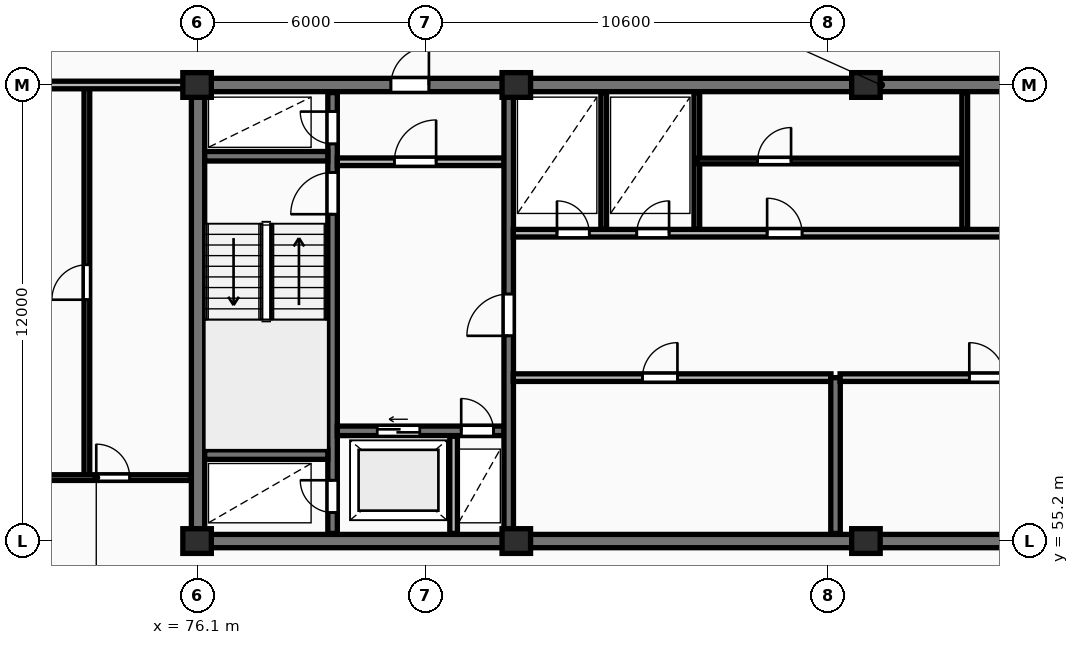
"""IFC4 building model, lengths in metres.
Left out: names, types, materials, properties, quantities, classifications, styles, units other than length and angle.
Written with IfcOpenShell. Run it as: python <this file> out.ifc"""

import sys

from ifc_helpers import new_model, si_unit, direction, frame, frame_2d, origin, origin_2d, place, context, subcontext, project, spatial, rectangle, extrude, element, fill, save


model = new_model("IFC4")
c1 = context("Model", 3, precision=1e-05, world=origin(), true_north=direction((0.0, 1.0)))
c2 = subcontext(c1, "Body", "Model", "MODEL_VIEW")
j1 = project(units=[si_unit("LENGTHUNIT", "METRE"), si_unit("PLANEANGLEUNIT", "RADIAN")], contexts=[c1])
p1 = place(None, origin())
s1 = spatial("IfcSite", under=j1, at=p1, CompositionType="ELEMENT")
p2 = place(p1, origin())
s2 = spatial("IfcBuilding", under=s1, at=p2, CompositionType="ELEMENT")
p3 = place(p2, frame((0.0, 0.0, 256.25)))
s3 = spatial("IfcBuildingStorey", under=s2, at=p3, CompositionType="ELEMENT", Elevation=256.25)
for number, where, z_axis, x_axis in (
    (1, (76.1, 55.2, 0.0), (0.0, 0.0, 1.0), (1.0, 0.0, 0.0)),
    (2, (76.1, 67.2, 0.0), (0.0, 0.0, 1.0), (1.0, 0.0, 0.0)),
    (3, (84.5, 55.2, 0.0), (0.0, 0.0, 1.0), (1.0, 0.0, 0.0)),
    (4, (84.5, 67.2, 0.0), (0.0, 0.0, 1.0), (1.0, 0.0, 0.0)),
    (5, (93.7, 55.2, 0.0), (0.0, 0.0, 1.0), (1.0, 0.0, 0.0)),
    (6, (93.7, 67.2, 0.0), (0.0, 0.0, 1.0), (1.0, 0.0, 0.0)),
):
    element("IfcColumn", number, at=place(p3, frame(where, z_axis=z_axis, x_axis=x_axis)), inside=s3, PredefinedType="COLUMN", context=c2, shape_type="SweptSolid", body=[
        extrude(rectangle(XDim=0.75, YDim=0.65, at=origin_2d()), origin(), (0.0, 0.0, 1.0), 3.45),
    ])
p4 = place(p3, frame((75.95, 55.2, 0.0), z_axis=(0.0, 0.0, 1.0), x_axis=(1.0, 0.0, 0.0)))
e7 = element("IfcWall", 7, at=p4, inside=s3, PredefinedType="SHEAR", context=c2, shape_type="SweptSolid", body=[
    extrude(rectangle(XDim=36.3, YDim=0.35, at=frame_2d((18.15, 0.0))), origin(), (0.0, 0.0, 1.0), 3.45),
])
p5 = place(p3, frame((76.125, 55.375, 0.0), z_axis=(0.0, 0.0, 1.0), x_axis=(0.0, 1.0, 0.0)))
e8 = element("IfcWall", 8, at=p5, inside=s3, PredefinedType="SHEAR", context=c2, shape_type="SweptSolid", body=[
    extrude(rectangle(XDim=11.65, YDim=0.35, at=frame_2d((5.825, 0.0))), origin(), (0.0, 0.0, 1.0), 3.45),
])
p6 = place(p3, frame((75.95, 67.2, 0.0), z_axis=(0.0, 0.0, 1.0), x_axis=(1.0, 0.0, 0.0)))
e9 = element("IfcWall", 9, at=p6, inside=s3, PredefinedType="SHEAR", context=c2, shape_type="SweptSolid", body=[
    extrude(rectangle(XDim=36.3, YDim=0.35, at=frame_2d((18.15, 0.0))), origin(), (0.0, 0.0, 1.0), 3.45),
])
p7 = place(p6, frame((5.25, 0.0, 0.0)))
e10 = element("IfcOpeningElement", 10, at=p7, cuts=e9, PredefinedType="OPENING", context=c2, shape_type="SweptSolid", body=[
    extrude(rectangle(XDim=1.0, YDim=2.15, at=frame_2d((0.5, 1.075))), frame((0.0, 0.185, 0.0), z_axis=(0.0, -1.0, 0.0), x_axis=(1.0, 0.0, 0.0)), (0.0, 0.0, 1.0), 0.37),
])
p8 = place(p6, frame((21.6, 0.0, 0.0)))
e11 = element("IfcOpeningElement", 11, at=p8, cuts=e9, PredefinedType="OPENING", context=c2, shape_type="SweptSolid", body=[
    extrude(rectangle(XDim=1.5, YDim=2.2, at=frame_2d((0.75, 1.1))), frame((0.0, 0.185, 0.0), z_axis=(0.0, -1.0, 0.0), x_axis=(1.0, 0.0, 0.0)), (0.0, 0.0, 1.0), 0.37),
])
p9 = place(p6, frame((30.45, 0.0, 0.0)))
e12 = element("IfcOpeningElement", 12, at=p9, cuts=e9, PredefinedType="OPENING", context=c2, shape_type="SweptSolid", body=[
    extrude(rectangle(XDim=1.0, YDim=2.15, at=frame_2d((0.5, 1.075))), frame((0.0, 0.185, 0.0), z_axis=(0.0, -1.0, 0.0), x_axis=(1.0, 0.0, 0.0)), (0.0, 0.0, 1.0), 0.37),
])
p10 = place(p3, frame((79.665, 55.4, 0.0), z_axis=(0.0, 0.0, 1.0), x_axis=(0.0, 1.0, 0.0)))
e13 = element("IfcWall", 13, at=p10, inside=s3, PredefinedType="SHEAR", context=c2, shape_type="SweptSolid", body=[
    extrude(rectangle(XDim=11.6, YDim=0.25, at=frame_2d((5.8, 0.0))), origin(), (0.0, 0.0, 1.0), 3.45),
])
p11 = place(p10, frame((0.55, 0.0, 0.0)))
e14 = element("IfcOpeningElement", 14, at=p11, cuts=e13, PredefinedType="OPENING", context=c2, shape_type="SweptSolid", body=[
    extrude(rectangle(XDim=0.85, YDim=2.05, at=frame_2d((0.425, 1.025))), frame((0.0, 0.135, 0.0), z_axis=(0.0, -1.0, 0.0), x_axis=(1.0, 0.0, 0.0)), (0.0, 0.0, 1.0), 0.27),
])
p12 = place(p10, frame((8.4, 0.0, 0.0)))
e15 = element("IfcOpeningElement", 15, at=p12, cuts=e13, PredefinedType="OPENING", context=c2, shape_type="SweptSolid", body=[
    extrude(rectangle(XDim=1.1, YDim=2.1, at=frame_2d((0.55, 1.05))), frame((0.0, 0.135, 0.0), z_axis=(0.0, -1.0, 0.0), x_axis=(1.0, 0.0, 0.0)), (0.0, 0.0, 1.0), 0.27),
])
p13 = place(p10, frame((10.25, 0.0, 0.0)))
e16 = element("IfcOpeningElement", 16, at=p13, cuts=e13, PredefinedType="OPENING", context=c2, shape_type="SweptSolid", body=[
    extrude(rectangle(XDim=0.85, YDim=2.05, at=frame_2d((0.425, 1.025))), frame((0.0, 0.135, 0.0), z_axis=(0.0, -1.0, 0.0), x_axis=(1.0, 0.0, 0.0)), (0.0, 0.0, 1.0), 0.27),
])
for number, where, z_axis, x_axis in (
    (17, (76.3, 57.475, 0.0), (0.0, 0.0, 1.0), (1.0, 0.0, 0.0)),
    (18, (76.3, 65.325, 0.0), (0.0, 0.0, 1.0), (1.0, 0.0, 0.0)),
):
    element("IfcWall", number, at=place(p3, frame(where, z_axis=z_axis, x_axis=x_axis)), inside=s3, PredefinedType="SHEAR", context=c2, shape_type="SweptSolid", body=[
        extrude(rectangle(XDim=3.24, YDim=0.25, at=frame_2d((1.62, 0.0))), origin(), (0.0, 0.0, 1.0), 3.45),
    ])
p14 = place(p3, frame((79.79, 58.1, 0.0), z_axis=(0.0, 0.0, 1.0), x_axis=(1.0, 0.0, 0.0)))
e19 = element("IfcWall", 19, at=p14, inside=s3, PredefinedType="SHEAR", context=c2, shape_type="SweptSolid", body=[
    extrude(rectangle(XDim=4.39, YDim=0.25, at=frame_2d((2.195, 0.0))), origin(), (0.0, 0.0, 1.0), 3.45),
])
p15 = place(p14, frame((1.05, 0.0, 0.0)))
e20 = element("IfcOpeningElement", 20, at=p15, cuts=e19, PredefinedType="OPENING", context=c2, shape_type="SweptSolid", body=[
    extrude(rectangle(XDim=1.12, YDim=2.12, at=frame_2d((0.56, 1.06))), frame((0.0, 0.135, 0.0), z_axis=(0.0, -1.0, 0.0), x_axis=(1.0, 0.0, 0.0)), (0.0, 0.0, 1.0), 0.27),
])
p16 = place(p14, frame((3.26, 0.0, 0.0)))
e21 = element("IfcOpeningElement", 21, at=p16, cuts=e19, PredefinedType="OPENING", context=c2, shape_type="SweptSolid", body=[
    extrude(rectangle(XDim=0.85, YDim=2.05, at=frame_2d((0.425, 1.025))), frame((0.0, 0.135, 0.0), z_axis=(0.0, -1.0, 0.0), x_axis=(1.0, 0.0, 0.0)), (0.0, 0.0, 1.0), 0.27),
])
p17 = place(p3, frame((82.85, 55.4, 0.0), z_axis=(0.0, 0.0, 1.0), x_axis=(0.0, 1.0, 0.0)))
e22 = element("IfcWall", 22, at=p17, inside=s3, PredefinedType="PARTITIONING", context=c2, shape_type="SweptSolid", body=[
    extrude(rectangle(XDim=2.56, YDim=0.2, at=frame_2d((1.28, 0.0))), origin(), (0.0, 0.0, 1.0), 3.17),
])
p18 = place(p3, frame((79.79, 65.18, 0.0), z_axis=(0.0, 0.0, 1.0), x_axis=(1.0, 0.0, 0.0)))
e23 = element("IfcWall", 23, at=p18, inside=s3, PredefinedType="PARTITIONING", context=c2, shape_type="SweptSolid", body=[
    extrude(rectangle(XDim=4.39, YDim=0.2, at=frame_2d((2.195, 0.0))), origin(), (0.0, 0.0, 1.0), 3.17),
])
p19 = place(p18, frame((1.5, 0.0, 0.0)))
e24 = element("IfcOpeningElement", 24, at=p19, cuts=e23, PredefinedType="OPENING", context=c2, shape_type="SweptSolid", body=[
    extrude(rectangle(XDim=1.1, YDim=2.1, at=frame_2d((0.55, 1.05))), frame((0.0, 0.11, 0.0), z_axis=(0.0, -1.0, 0.0), x_axis=(1.0, 0.0, 0.0)), (0.0, 0.0, 1.0), 0.22),
])
p20 = place(p3, frame((84.3, 55.4, 0.0), z_axis=(0.0, 0.0, 1.0), x_axis=(0.0, 1.0, 0.0)))
e25 = element("IfcWall", 25, at=p20, inside=s3, PredefinedType="SHEAR", context=c2, shape_type="SweptSolid", body=[
    extrude(rectangle(XDim=11.6, YDim=0.25, at=frame_2d((5.8, 0.0))), origin(), (0.0, 0.0, 1.0), 3.45),
])
p21 = place(p20, frame((5.2, 0.0, 0.0)))
e26 = element("IfcOpeningElement", 26, at=p21, cuts=e25, PredefinedType="OPENING", context=c2, shape_type="SweptSolid", body=[
    extrude(rectangle(XDim=1.1, YDim=2.1, at=frame_2d((0.55, 1.05))), frame((0.0, 0.135, 0.0), z_axis=(0.0, -1.0, 0.0), x_axis=(1.0, 0.0, 0.0)), (0.0, 0.0, 1.0), 0.27),
])
p22 = place(p3, frame((84.42, 59.5, 0.0), z_axis=(0.0, 0.0, 1.0), x_axis=(1.0, 0.0, 0.0)))
e27 = element("IfcWall", 27, at=p22, inside=s3, PredefinedType="PARTITIONING", context=c2, shape_type="SweptSolid", body=[
    extrude(rectangle(XDim=8.36, YDim=0.2, at=frame_2d((4.18, 0.0))), origin(), (0.0, 0.0, 1.0), 3.17),
])
p23 = place(p22, frame((3.4, 0.0, 0.0)))
e28 = element("IfcOpeningElement", 28, at=p23, cuts=e27, PredefinedType="OPENING", context=c2, shape_type="SweptSolid", body=[
    extrude(rectangle(XDim=0.92, YDim=2.08, at=frame_2d((0.46, 1.04))), frame((0.0, 0.11, 0.0), z_axis=(0.0, -1.0, 0.0), x_axis=(1.0, 0.0, 0.0)), (0.0, 0.0, 1.0), 0.22),
])
p24 = place(p3, frame((92.9, 55.4, 0.0), z_axis=(0.0, 0.0, 1.0), x_axis=(0.0, 1.0, 0.0)))
e29 = element("IfcWall", 29, at=p24, inside=s3, PredefinedType="SHEAR", context=c2, shape_type="SweptSolid", body=[
    extrude(rectangle(XDim=4.1, YDim=0.25, at=frame_2d((2.05, 0.0))), origin(), (0.0, 0.0, 1.0), 3.45),
])
p25 = place(p3, frame((93.02, 59.5, 0.0), z_axis=(0.0, 0.0, 1.0), x_axis=(1.0, 0.0, 0.0)))
e30 = element("IfcWall", 30, at=p25, inside=s3, PredefinedType="PARTITIONING", context=c2, shape_type="SweptSolid", body=[
    extrude(rectangle(XDim=8.36, YDim=0.2, at=frame_2d((4.18, 0.0))), origin(), (0.0, 0.0, 1.0), 3.17),
])
p26 = place(p25, frame((3.4, 0.0, 0.0)))
e31 = element("IfcOpeningElement", 31, at=p26, cuts=e30, PredefinedType="OPENING", context=c2, shape_type="SweptSolid", body=[
    extrude(rectangle(XDim=0.92, YDim=2.08, at=frame_2d((0.46, 1.04))), frame((0.0, 0.11, 0.0), z_axis=(0.0, -1.0, 0.0), x_axis=(1.0, 0.0, 0.0)), (0.0, 0.0, 1.0), 0.22),
])
for number, where, z_axis, x_axis in (
    (32, (86.8, 63.4, 0.0), (0.0, 0.0, 1.0), (0.0, 1.0, 0.0)),
    (33, (89.25, 63.4, 0.0), (0.0, 0.0, 1.0), (0.0, 1.0, 0.0)),
):
    element("IfcWall", number, at=place(p3, frame(where, z_axis=z_axis, x_axis=x_axis)), inside=s3, PredefinedType="PARTITIONING", context=c2, shape_type="SweptSolid", body=[
        extrude(rectangle(XDim=3.6, YDim=0.15, at=frame_2d((1.8, 0.0))), origin(), (0.0, 0.0, 1.0), 3.17),
    ])
p27 = place(p3, frame((89.25, 65.2, 0.0), z_axis=(0.0, 0.0, 1.0), x_axis=(1.0, 0.0, 0.0)))
e34 = element("IfcWall", 34, at=p27, inside=s3, PredefinedType="PARTITIONING", context=c2, shape_type="SweptSolid", body=[
    extrude(rectangle(XDim=7.05, YDim=0.15, at=frame_2d((3.525, 0.0))), origin(), (0.0, 0.0, 1.0), 3.17),
])
p28 = place(p27, frame((1.6, 0.0, 0.0)))
e35 = element("IfcOpeningElement", 35, at=p28, cuts=e34, PredefinedType="OPENING", context=c2, shape_type="SweptSolid", body=[
    extrude(rectangle(XDim=0.88, YDim=2.06, at=frame_2d((0.44, 1.03))), frame((0.0, 0.085, 0.0), z_axis=(0.0, -1.0, 0.0), x_axis=(1.0, 0.0, 0.0)), (0.0, 0.0, 1.0), 0.17),
])
p29 = place(p3, frame((96.3, 63.4, 0.0), z_axis=(0.0, 0.0, 1.0), x_axis=(0.0, 1.0, 0.0)))
e36 = element("IfcWall", 36, at=p29, inside=s3, PredefinedType="PARTITIONING", context=c2, shape_type="SweptSolid", body=[
    extrude(rectangle(XDim=3.6, YDim=0.15, at=frame_2d((1.8, 0.0))), origin(), (0.0, 0.0, 1.0), 3.17),
])
p30 = place(p3, frame((84.42, 63.3, 0.0), z_axis=(0.0, 0.0, 1.0), x_axis=(1.0, 0.0, 0.0)))
e37 = element("IfcWall", 37, at=p30, inside=s3, PredefinedType="PARTITIONING", context=c2, shape_type="SweptSolid", body=[
    extrude(rectangle(XDim=19.83, YDim=0.2, at=frame_2d((9.915, 0.0))), origin(), (0.0, 0.0, 1.0), 3.17),
])
p31 = place(p30, frame((1.15, 0.0, 0.0)))
e38 = element("IfcOpeningElement", 38, at=p31, cuts=e37, PredefinedType="OPENING", context=c2, shape_type="SweptSolid", body=[
    extrude(rectangle(XDim=0.85, YDim=2.05, at=frame_2d((0.425, 1.025))), frame((0.0, 0.11, 0.0), z_axis=(0.0, -1.0, 0.0), x_axis=(1.0, 0.0, 0.0)), (0.0, 0.0, 1.0), 0.22),
])
p32 = place(p30, frame((3.25, 0.0, 0.0)))
e39 = element("IfcOpeningElement", 39, at=p32, cuts=e37, PredefinedType="OPENING", context=c2, shape_type="SweptSolid", body=[
    extrude(rectangle(XDim=0.85, YDim=2.05, at=frame_2d((0.425, 1.025))), frame((0.0, 0.11, 0.0), z_axis=(0.0, -1.0, 0.0), x_axis=(1.0, 0.0, 0.0)), (0.0, 0.0, 1.0), 0.22),
])
p33 = place(p30, frame((13.08, 0.0, 0.0)))
e40 = element("IfcOpeningElement", 40, at=p33, cuts=e37, PredefinedType="OPENING", context=c2, shape_type="SweptSolid", body=[
    extrude(rectangle(XDim=1.5, YDim=2.2, at=frame_2d((0.75, 1.1))), frame((0.0, 0.11, 0.0), z_axis=(0.0, -1.0, 0.0), x_axis=(1.0, 0.0, 0.0)), (0.0, 0.0, 1.0), 0.22),
])
p34 = place(p30, frame((6.68, 0.0, 0.0)))
e41 = element("IfcOpeningElement", 41, at=p34, cuts=e37, PredefinedType="OPENING", context=c2, shape_type="SweptSolid", body=[
    extrude(rectangle(XDim=0.92, YDim=2.08, at=frame_2d((0.46, 1.04))), frame((0.0, 0.11, 0.0), z_axis=(0.0, -1.0, 0.0), x_axis=(1.0, 0.0, 0.0)), (0.0, 0.0, 1.0), 0.22),
])
p35 = place(p30, frame((16.33, 0.0, 0.0)))
e42 = element("IfcOpeningElement", 42, at=p35, cuts=e37, PredefinedType="OPENING", context=c2, shape_type="SweptSolid", body=[
    extrude(rectangle(XDim=0.88, YDim=2.06, at=frame_2d((0.44, 1.03))), frame((0.0, 0.11, 0.0), z_axis=(0.0, -1.0, 0.0), x_axis=(1.0, 0.0, 0.0)), (0.0, 0.0, 1.0), 0.22),
])
p36 = place(p3, frame((73.2, 56.87, 0.0), z_axis=(0.0, 0.0, 1.0), x_axis=(0.0, 1.0, 0.0)))
e43 = element("IfcWall", 43, at=p36, inside=s3, PredefinedType="PARTITIONING", context=c2, shape_type="SweptSolid", body=[
    extrude(rectangle(XDim=10.28, YDim=0.15, at=frame_2d((5.14, 0.0))), origin(), (0.0, 0.0, 1.0), 3.17),
])
p37 = place(p36, frame((4.68, 0.0, 0.0)))
e44 = element("IfcOpeningElement", 44, at=p37, cuts=e43, PredefinedType="OPENING", context=c2, shape_type="SweptSolid", body=[
    extrude(rectangle(XDim=0.92, YDim=2.08, at=frame_2d((0.46, 1.04))), frame((0.0, 0.085, 0.0), z_axis=(0.0, -1.0, 0.0), x_axis=(1.0, 0.0, 0.0)), (0.0, 0.0, 1.0), 0.17),
])
p38 = place(p3, frame((69.17, 56.87, 0.0), z_axis=(0.0, 0.0, 1.0), x_axis=(1.0, 0.0, 0.0)))
e45 = element("IfcWall", 45, at=p38, inside=s3, PredefinedType="PARTITIONING", context=c2, shape_type="SweptSolid", body=[
    extrude(rectangle(XDim=6.76, YDim=0.15, at=frame_2d((3.38, 0.0))), origin(), (0.0, 0.0, 1.0), 3.17),
])
p39 = place(p38, frame((1.362, 0.0, 0.0)))
e46 = element("IfcOpeningElement", 46, at=p39, cuts=e45, PredefinedType="OPENING", context=c2, shape_type="SweptSolid", body=[
    extrude(rectangle(XDim=0.84, YDim=2.04, at=frame_2d((0.42, 1.02))), frame((0.0, 0.085, 0.0), z_axis=(0.0, -1.0, 0.0), x_axis=(1.0, 0.0, 0.0)), (0.0, 0.0, 1.0), 0.17),
])
p40 = place(p38, frame((4.277, 0.0, 0.0)))
e47 = element("IfcOpeningElement", 47, at=p40, cuts=e45, PredefinedType="OPENING", context=c2, shape_type="SweptSolid", body=[
    extrude(rectangle(XDim=0.88, YDim=2.06, at=frame_2d((0.44, 1.03))), frame((0.0, 0.085, 0.0), z_axis=(0.0, -1.0, 0.0), x_axis=(1.0, 0.0, 0.0)), (0.0, 0.0, 1.0), 0.17),
])
p41 = place(p3, frame((59.8, 67.2, 0.0), z_axis=(0.0, 0.0, 1.0), x_axis=(1.0, 0.0, 0.0)))
e48 = element("IfcWall", 48, at=p41, inside=s3, PredefinedType="PARTITIONING", context=c2, shape_type="SweptSolid", body=[
    extrude(rectangle(XDim=16.15, YDim=0.2, at=frame_2d((8.075, 0.0))), origin(), (0.0, 0.0, 1.0), 2.633),
])
p42 = place(p41, frame((9.772, 0.0, 0.0)))
e49 = element("IfcOpeningElement", 49, at=p42, cuts=e48, PredefinedType="OPENING", context=c2, shape_type="SweptSolid", body=[
    extrude(rectangle(XDim=0.95, YDim=2.15, at=frame_2d((0.475, 1.075))), frame((0.0, 0.11, 0.0), z_axis=(0.0, -1.0, 0.0), x_axis=(1.0, 0.0, 0.0)), (0.0, 0.0, 1.0), 0.22),
])
p43 = place(p7, origin())
e50 = element("IfcDoor", 50, at=p43, inside=s3, OperationType="SINGLE_SWING_RIGHT", PredefinedType="DOOR", context=c2, shape_type="SweptSolid", body=[
    extrude(rectangle(XDim=1.0, YDim=2.15, at=frame_2d((0.5, 1.075))), frame((0.0, 0.025, 0.0), z_axis=(0.0, -1.0, 0.0), x_axis=(1.0, 0.0, 0.0)), (0.0, 0.0, 1.0), 0.05),
])
fill(e10, e50)
p44 = place(p11, origin())
e51 = element("IfcDoor", 51, at=p44, inside=s3, OperationType="SINGLE_SWING_RIGHT", PredefinedType="DOOR", context=c2, shape_type="SweptSolid", body=[
    extrude(rectangle(XDim=0.85, YDim=2.05, at=frame_2d((0.425, 1.025))), frame((0.0, 0.025, 0.0), z_axis=(0.0, -1.0, 0.0), x_axis=(1.0, 0.0, 0.0)), (0.0, 0.0, 1.0), 0.05),
])
fill(e14, e51)
p45 = place(p12, origin())
e52 = element("IfcDoor", 52, at=p45, inside=s3, OperationType="SINGLE_SWING_LEFT", PredefinedType="DOOR", context=c2, shape_type="SweptSolid", body=[
    extrude(rectangle(XDim=1.1, YDim=2.1, at=frame_2d((0.55, 1.05))), frame((0.0, 0.025, 0.0), z_axis=(0.0, -1.0, 0.0), x_axis=(1.0, 0.0, 0.0)), (0.0, 0.0, 1.0), 0.05),
])
fill(e15, e52)
p46 = place(p13, origin())
e53 = element("IfcDoor", 53, at=p46, inside=s3, OperationType="SINGLE_SWING_RIGHT", PredefinedType="DOOR", context=c2, shape_type="SweptSolid", body=[
    extrude(rectangle(XDim=0.85, YDim=2.05, at=frame_2d((0.425, 1.025))), frame((0.0, 0.025, 0.0), z_axis=(0.0, -1.0, 0.0), x_axis=(1.0, 0.0, 0.0)), (0.0, 0.0, 1.0), 0.05),
])
fill(e16, e53)
p47 = place(p15, origin())
e54 = element("IfcDoor", 54, at=p47, inside=s3, OperationType="SLIDING_TO_LEFT", PredefinedType="DOOR", context=c2, shape_type="SweptSolid", body=[
    extrude(rectangle(XDim=1.12, YDim=2.12, at=frame_2d((0.56, 1.06))), frame((0.0, 0.025, 0.0), z_axis=(0.0, -1.0, 0.0), x_axis=(1.0, 0.0, 0.0)), (0.0, 0.0, 1.0), 0.05),
])
fill(e20, e54)
p48 = place(p16, origin())
e55 = element("IfcDoor", 55, at=p48, inside=s3, OperationType="SINGLE_SWING_LEFT", PredefinedType="DOOR", context=c2, shape_type="SweptSolid", body=[
    extrude(rectangle(XDim=0.85, YDim=2.05, at=frame_2d((0.425, 1.025))), frame((0.0, 0.025, 0.0), z_axis=(0.0, -1.0, 0.0), x_axis=(1.0, 0.0, 0.0)), (0.0, 0.0, 1.0), 0.05),
])
fill(e21, e55)
p49 = place(p19, origin())
e56 = element("IfcDoor", 56, at=p49, inside=s3, OperationType="SINGLE_SWING_RIGHT", PredefinedType="DOOR", context=c2, shape_type="SweptSolid", body=[
    extrude(rectangle(XDim=1.1, YDim=2.1, at=frame_2d((0.55, 1.05))), frame((0.0, 0.025, 0.0), z_axis=(0.0, -1.0, 0.0), x_axis=(1.0, 0.0, 0.0)), (0.0, 0.0, 1.0), 0.05),
])
fill(e24, e56)
p50 = place(p21, origin())
e57 = element("IfcDoor", 57, at=p50, inside=s3, OperationType="SINGLE_SWING_LEFT", PredefinedType="DOOR", context=c2, shape_type="SweptSolid", body=[
    extrude(rectangle(XDim=1.1, YDim=2.1, at=frame_2d((0.55, 1.05))), frame((0.0, 0.025, 0.0), z_axis=(0.0, -1.0, 0.0), x_axis=(1.0, 0.0, 0.0)), (0.0, 0.0, 1.0), 0.05),
])
fill(e26, e57)
p51 = place(p23, origin())
e58 = element("IfcDoor", 58, at=p51, inside=s3, OperationType="SINGLE_SWING_RIGHT", PredefinedType="DOOR", context=c2, shape_type="SweptSolid", body=[
    extrude(rectangle(XDim=0.92, YDim=2.08, at=frame_2d((0.46, 1.04))), frame((0.0, 0.025, 0.0), z_axis=(0.0, -1.0, 0.0), x_axis=(1.0, 0.0, 0.0)), (0.0, 0.0, 1.0), 0.05),
])
fill(e28, e58)
p52 = place(p26, origin())
e59 = element("IfcDoor", 59, at=p52, inside=s3, OperationType="SINGLE_SWING_LEFT", PredefinedType="DOOR", context=c2, shape_type="SweptSolid", body=[
    extrude(rectangle(XDim=0.92, YDim=2.08, at=frame_2d((0.46, 1.04))), frame((0.0, 0.025, 0.0), z_axis=(0.0, -1.0, 0.0), x_axis=(1.0, 0.0, 0.0)), (0.0, 0.0, 1.0), 0.05),
])
fill(e31, e59)
p53 = place(p28, origin())
e60 = element("IfcDoor", 60, at=p53, inside=s3, OperationType="SINGLE_SWING_RIGHT", PredefinedType="DOOR", context=c2, shape_type="SweptSolid", body=[
    extrude(rectangle(XDim=0.88, YDim=2.06, at=frame_2d((0.44, 1.03))), frame((0.0, 0.025, 0.0), z_axis=(0.0, -1.0, 0.0), x_axis=(1.0, 0.0, 0.0)), (0.0, 0.0, 1.0), 0.05),
])
fill(e35, e60)
p54 = place(p31, origin())
e61 = element("IfcDoor", 61, at=p54, inside=s3, OperationType="SINGLE_SWING_LEFT", PredefinedType="DOOR", context=c2, shape_type="SweptSolid", body=[
    extrude(rectangle(XDim=0.85, YDim=2.05, at=frame_2d((0.425, 1.025))), frame((0.0, 0.025, 0.0), z_axis=(0.0, -1.0, 0.0), x_axis=(1.0, 0.0, 0.0)), (0.0, 0.0, 1.0), 0.05),
])
fill(e38, e61)
p55 = place(p32, origin())
e62 = element("IfcDoor", 62, at=p55, inside=s3, OperationType="SINGLE_SWING_RIGHT", PredefinedType="DOOR", context=c2, shape_type="SweptSolid", body=[
    extrude(rectangle(XDim=0.85, YDim=2.05, at=frame_2d((0.425, 1.025))), frame((0.0, 0.025, 0.0), z_axis=(0.0, -1.0, 0.0), x_axis=(1.0, 0.0, 0.0)), (0.0, 0.0, 1.0), 0.05),
])
fill(e39, e62)
p56 = place(p34, origin())
e63 = element("IfcDoor", 63, at=p56, inside=s3, OperationType="SINGLE_SWING_LEFT", PredefinedType="DOOR", context=c2, shape_type="SweptSolid", body=[
    extrude(rectangle(XDim=0.92, YDim=2.08, at=frame_2d((0.46, 1.04))), frame((0.0, 0.025, 0.0), z_axis=(0.0, -1.0, 0.0), x_axis=(1.0, 0.0, 0.0)), (0.0, 0.0, 1.0), 0.05),
])
fill(e41, e63)
p57 = place(p37, origin())
e64 = element("IfcDoor", 64, at=p57, inside=s3, OperationType="SINGLE_SWING_LEFT", PredefinedType="DOOR", context=c2, shape_type="SweptSolid", body=[
    extrude(rectangle(XDim=0.92, YDim=2.08, at=frame_2d((0.46, 1.04))), frame((0.0, 0.025, 0.0), z_axis=(0.0, -1.0, 0.0), x_axis=(1.0, 0.0, 0.0)), (0.0, 0.0, 1.0), 0.05),
])
fill(e44, e64)
p58 = place(p40, origin())
e65 = element("IfcDoor", 65, at=p58, inside=s3, OperationType="SINGLE_SWING_LEFT", PredefinedType="DOOR", context=c2, shape_type="SweptSolid", body=[
    extrude(rectangle(XDim=0.88, YDim=2.06, at=frame_2d((0.44, 1.03))), frame((0.0, 0.025, 0.0), z_axis=(0.0, -1.0, 0.0), x_axis=(1.0, 0.0, 0.0)), (0.0, 0.0, 1.0), 0.05),
])
fill(e47, e65)
save(model, sys.argv[1])
